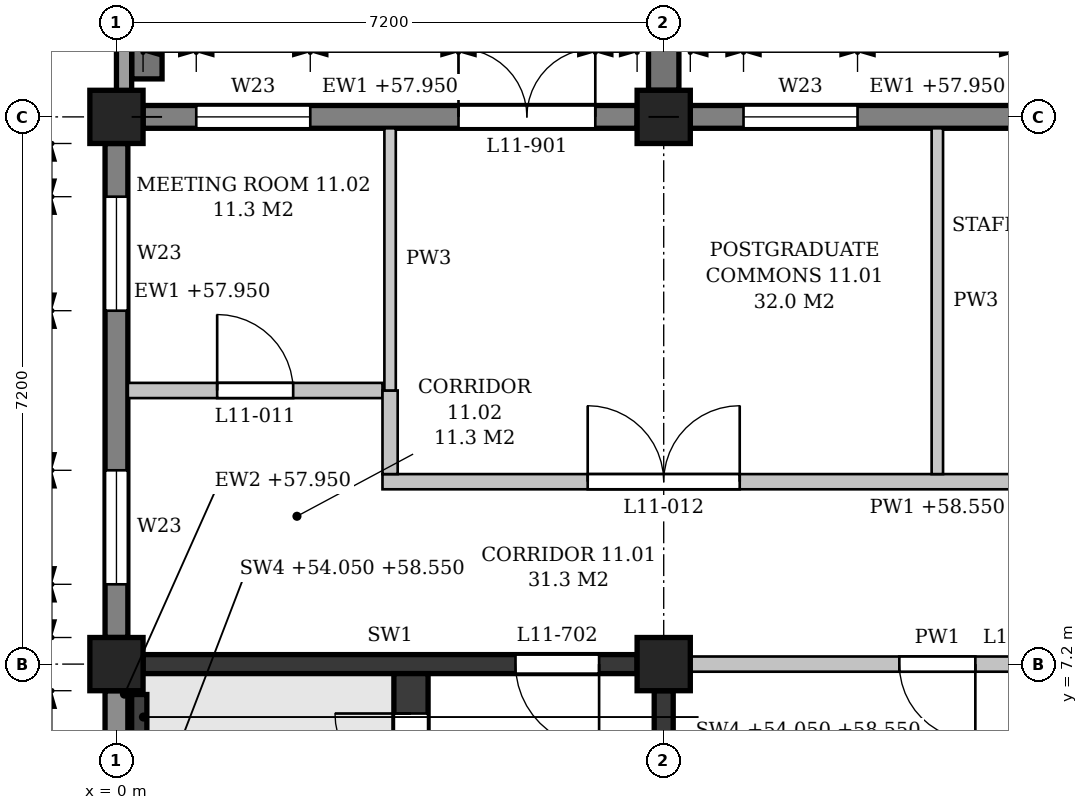
"""IFC4 building model, lengths in metres.
Left out: names, types, materials, properties, quantities, classifications, styles, units other than length and angle.
Written with IfcOpenShell. Run it as: python <this file> out.ifc"""

import sys

from ifc_helpers import new_model, si_unit, direction, frame, frame_2d, origin, origin_2d, place, context, subcontext, project, spatial, polyline, rectangle, outline, extrude, element, fill, save


model = new_model("IFC4")
c1 = context("Model", 3, precision=1e-05, world=origin(), true_north=direction((0.0, 1.0)))
c2 = subcontext(c1, "Body", "Model", "MODEL_VIEW")
j1 = project(units=[si_unit("LENGTHUNIT", "METRE"), si_unit("PLANEANGLEUNIT", "RADIAN")], contexts=[c1])
p1 = place(None, origin())
s1 = spatial("IfcSite", under=j1, at=p1, CompositionType="ELEMENT")
p2 = place(p1, origin())
s2 = spatial("IfcBuilding", under=s1, at=p2, CompositionType="ELEMENT")
p3 = place(p2, frame((0.0, 0.0, 54.3)))
s3 = spatial("IfcBuildingStorey", under=s2, at=p3, CompositionType="ELEMENT", Elevation=54.3)
for number, where, z_axis, x_axis in (
    (1, (0.0, 7.2, 0.0), (0.0, 0.0, 1.0), (1.0, 0.0, 0.0)),
    (2, (0.0, 14.4, 0.0), (0.0, 0.0, 1.0), (1.0, 0.0, 0.0)),
    (3, (7.2, 7.2, 0.0), (0.0, 0.0, 1.0), (1.0, 0.0, 0.0)),
    (4, (7.2, 14.4, 0.0), (0.0, 0.0, 1.0), (1.0, 0.0, 0.0)),
):
    element("IfcColumn", number, at=place(p3, frame(where, z_axis=z_axis, x_axis=x_axis)), inside=s3, PredefinedType="COLUMN", context=c2, shape_type="SweptSolid", body=[
        extrude(rectangle(XDim=0.7, YDim=0.7, at=origin_2d()), origin(), (0.0, 0.0, 1.0), 4.5),
    ])
p4 = place(p3, frame((0.1, 14.55, 0.0), z_axis=(0.0, 0.0, 1.0), x_axis=(0.0, 1.0, 0.0)))
e5 = element("IfcWall", 5, at=p4, inside=s3, PredefinedType="STANDARD", context=c2, shape_type="SweptSolid", body=[
    extrude(rectangle(XDim=7.05, YDim=0.2, at=frame_2d((3.525, 0.0))), origin(), (0.0, 0.0, 1.0), 0.15),
])
p5 = place(p3, frame((0.0, 0.35, 0.0), z_axis=(0.0, 0.0, 1.0), x_axis=(0.0, 1.0, 0.0)))
e6 = element("IfcWall", 6, at=p5, inside=s3, PredefinedType="STANDARD", context=c2, shape_type="SweptSolid", body=[
    extrude(rectangle(XDim=6.5, YDim=0.3, at=frame_2d((3.25, 0.0))), origin(), (0.0, 0.0, 1.0), 3.65),
])
p6 = place(p5, frame((1.0, 0.0, 0.9)))
e7 = element("IfcOpeningElement", 7, at=p6, cuts=e6, PredefinedType="OPENING", context=c2, shape_type="SweptSolid", body=[
    extrude(outline(polyline([(0.0, 0.0), (0.9, 0.0), (0.9, 2.25), (0.45, 2.7), (0.0, 2.25), (0.0, 0.0)])), frame((0.0, 0.16, 0.0), z_axis=(0.0, -1.0, 0.0), x_axis=(1.0, 0.0, 0.0)), (0.0, 0.0, 1.0), 0.32),
])
p7 = place(p5, frame((4.6, 0.0, 0.9)))
e8 = element("IfcOpeningElement", 8, at=p7, cuts=e6, PredefinedType="OPENING", context=c2, shape_type="SweptSolid", body=[
    extrude(outline(polyline([(0.0, 0.0), (0.9, 0.0), (0.9, 2.25), (0.45, 2.7), (0.0, 2.25), (0.0, 0.0)])), frame((0.0, 0.16, 0.0), z_axis=(0.0, -1.0, 0.0), x_axis=(1.0, 0.0, 0.0)), (0.0, 0.0, 1.0), 0.32),
])
p8 = place(p3, frame((0.0, 7.55, 0.0), z_axis=(0.0, 0.0, 1.0), x_axis=(0.0, 1.0, 0.0)))
e9 = element("IfcWall", 9, at=p8, inside=s3, PredefinedType="STANDARD", context=c2, shape_type="SweptSolid", body=[
    extrude(rectangle(XDim=6.5, YDim=0.3, at=frame_2d((3.25, 0.0))), origin(), (0.0, 0.0, 1.0), 3.65),
])
p9 = place(p8, frame((0.7, 0.0, 0.9)))
e10 = element("IfcOpeningElement", 10, at=p9, cuts=e9, PredefinedType="OPENING", context=c2, shape_type="SweptSolid", body=[
    extrude(outline(polyline([(0.0, 0.0), (1.5, 0.0), (1.5, 1.95), (0.75, 2.7), (0.0, 1.95), (0.0, 0.0)])), frame((0.0, 0.16, 0.0), z_axis=(0.0, -1.0, 0.0), x_axis=(1.0, 0.0, 0.0)), (0.0, 0.0, 1.0), 0.32),
])
p10 = place(p8, frame((4.3, 0.0, 0.9)))
e11 = element("IfcOpeningElement", 11, at=p10, cuts=e9, PredefinedType="OPENING", context=c2, shape_type="SweptSolid", body=[
    extrude(outline(polyline([(0.0, 0.0), (1.5, 0.0), (1.5, 1.95), (0.75, 2.7), (0.0, 1.95), (0.0, 0.0)])), frame((0.0, 0.16, 0.0), z_axis=(0.0, -1.0, 0.0), x_axis=(1.0, 0.0, 0.0)), (0.0, 0.0, 1.0), 0.32),
])
p11 = place(p3, frame((14.05, 14.4, 0.0), z_axis=(0.0, 0.0, 1.0), x_axis=(-1.0, 0.0, 0.0)))
e12 = element("IfcWall", 12, at=p11, inside=s3, PredefinedType="STANDARD", context=c2, shape_type="SweptSolid", body=[
    extrude(rectangle(XDim=6.5, YDim=0.3, at=frame_2d((3.25, 0.0))), origin(), (0.0, 0.0, 1.0), 3.65),
])
p12 = place(p11, frame((0.7, 0.0, 0.9)))
e13 = element("IfcOpeningElement", 13, at=p12, cuts=e12, PredefinedType="OPENING", context=c2, shape_type="SweptSolid", body=[
    extrude(outline(polyline([(0.0, 0.0), (1.5, 0.0), (1.5, 1.95), (0.75, 2.7), (0.0, 1.95), (0.0, 0.0)])), frame((0.0, 0.16, 0.0), z_axis=(0.0, -1.0, 0.0), x_axis=(1.0, 0.0, 0.0)), (0.0, 0.0, 1.0), 0.32),
])
p13 = place(p11, frame((4.3, 0.0, 0.9)))
e14 = element("IfcOpeningElement", 14, at=p13, cuts=e12, PredefinedType="OPENING", context=c2, shape_type="SweptSolid", body=[
    extrude(outline(polyline([(0.0, 0.0), (1.5, 0.0), (1.5, 1.95), (0.75, 2.7), (0.0, 1.95), (0.0, 0.0)])), frame((0.0, 0.16, 0.0), z_axis=(0.0, -1.0, 0.0), x_axis=(1.0, 0.0, 0.0)), (0.0, 0.0, 1.0), 0.32),
])
p14 = place(p3, frame((6.85, 14.4, 0.0), z_axis=(0.0, 0.0, 1.0), x_axis=(-1.0, 0.0, 0.0)))
e15 = element("IfcWall", 15, at=p14, inside=s3, PredefinedType="STANDARD", context=c2, shape_type="SweptSolid", body=[
    extrude(rectangle(XDim=6.5, YDim=0.3, at=frame_2d((3.25, 0.0))), origin(), (0.0, 0.0, 1.0), 3.65),
])
p15 = place(p14, frame((0.55, 0.0, 0.0)))
e16 = element("IfcOpeningElement", 16, at=p15, cuts=e15, PredefinedType="OPENING", context=c2, shape_type="SweptSolid", body=[
    extrude(rectangle(XDim=1.8, YDim=2.4, at=frame_2d((0.9, 1.2))), frame((0.0, 0.16, 0.0), z_axis=(0.0, -1.0, 0.0), x_axis=(1.0, 0.0, 0.0)), (0.0, 0.0, 1.0), 0.32),
])
p16 = place(p14, frame((4.3, 0.0, 0.9)))
e17 = element("IfcOpeningElement", 17, at=p16, cuts=e15, PredefinedType="OPENING", context=c2, shape_type="SweptSolid", body=[
    extrude(outline(polyline([(0.0, 0.0), (1.5, 0.0), (1.5, 1.95), (0.75, 2.7), (0.0, 1.95), (0.0, 0.0)])), frame((0.0, 0.16, 0.0), z_axis=(0.0, -1.0, 0.0), x_axis=(1.0, 0.0, 0.0)), (0.0, 0.0, 1.0), 0.32),
])
for number, where, z_axis, x_axis in (
    (18, (0.4, 14.9, 0.0), (0.0, 0.0, 1.0), (0.0, 1.0, 0.0)),
    (19, (7.2, 14.75, 0.0), (0.0, 0.0, 1.0), (0.0, 1.0, 0.0)),
):
    element("IfcWall", number, at=place(p3, frame(where, z_axis=z_axis, x_axis=x_axis)), inside=s3, PredefinedType="POLYGONAL", context=c2, shape_type="SweptSolid", body=[
        extrude(outline(polyline([(0.65, 0.0), (0.65, 4.025), (0.5, 4.25), (0.0, 4.25), (0.0, 0.0), (0.65, 0.0)])), frame((0.0, 0.2, 0.0), z_axis=(0.0, -1.0, 0.0), x_axis=(1.0, 0.0, 0.0)), (0.0, 0.0, 1.0), 0.4),
    ])
p17 = place(p3, frame((0.35, 7.2, 0.0), z_axis=(0.0, 0.0, 1.0), x_axis=(1.0, 0.0, 0.0)))
e20 = element("IfcWall", 20, at=p17, inside=s3, PredefinedType="SHEAR", context=c2, shape_type="SweptSolid", body=[
    extrude(rectangle(XDim=6.5, YDim=0.25, at=frame_2d((3.25, 0.0))), origin(), (0.0, 0.0, 1.0), 3.55),
])
p18 = place(p17, frame((4.9, 0.0, 0.0)))
e21 = element("IfcOpeningElement", 21, at=p18, cuts=e20, PredefinedType="OPENING", context=c2, shape_type="SweptSolid", body=[
    extrude(rectangle(XDim=1.1, YDim=2.1, at=frame_2d((0.55, 1.05))), frame((0.0, 0.135, 0.0), z_axis=(0.0, -1.0, 0.0), x_axis=(1.0, 0.0, 0.0)), (0.0, 0.0, 1.0), 0.27),
])
p19 = place(p3, frame((7.2, 0.35, 0.0), z_axis=(0.0, 0.0, 1.0), x_axis=(0.0, 1.0, 0.0)))
e22 = element("IfcWall", 22, at=p19, inside=s3, PredefinedType="SHEAR", context=c2, shape_type="SweptSolid", body=[
    extrude(rectangle(XDim=6.5, YDim=0.25, at=frame_2d((3.25, 0.0))), origin(), (0.0, 0.0, 1.0), 3.55),
])
p20 = place(p3, frame((0.3, 5.85, -0.25), z_axis=(0.0, 0.0, 1.0), x_axis=(0.0, 1.0, 0.0)))
e23 = element("IfcWall", 23, at=p20, inside=s3, PredefinedType="SHEAR", context=c2, shape_type="SweptSolid", body=[
    extrude(rectangle(XDim=0.95, YDim=0.2, at=frame_2d((0.475, 0.0))), origin(), (0.0, 0.0, 1.0), 4.5),
])
p21 = place(p3, frame((3.875, 0.15, 0.0), z_axis=(0.0, 0.0, 1.0), x_axis=(0.0, 1.0, 0.0)))
e24 = element("IfcWall", 24, at=p21, inside=s3, PredefinedType="SHEAR", context=c2, shape_type="SweptSolid", body=[
    extrude(rectangle(XDim=6.925, YDim=0.45, at=frame_2d((3.462, 0.0))), origin(), (0.0, 0.0, 1.0), 4.25),
])
p22 = place(p21, frame((5.4, 0.0, 0.0)))
e25 = element("IfcOpeningElement", 25, at=p22, cuts=e24, PredefinedType="OPENING", context=c2, shape_type="SweptSolid", body=[
    extrude(rectangle(XDim=1.0, YDim=2.1, at=frame_2d((0.5, 1.05))), frame((0.0, 0.235, 0.0), z_axis=(0.0, -1.0, 0.0), x_axis=(1.0, 0.0, 0.0)), (0.0, 0.0, 1.0), 0.47),
])
p23 = place(p3, frame((7.55, 7.2, 0.0), z_axis=(0.0, 0.0, 1.0), x_axis=(1.0, 0.0, 0.0)))
e26 = element("IfcWall", 26, at=p23, inside=s3, PredefinedType="PARTITIONING", context=c2, shape_type="SweptSolid", body=[
    extrude(rectangle(XDim=6.5, YDim=0.2, at=frame_2d((3.25, 0.0))), origin(), (0.0, 0.0, 1.0), 3.55),
])
p24 = place(p23, frame((2.75, 0.0, 0.0)))
e27 = element("IfcOpeningElement", 27, at=p24, cuts=e26, PredefinedType="OPENING", context=c2, shape_type="SweptSolid", body=[
    extrude(rectangle(XDim=1.0, YDim=2.1, at=frame_2d((0.5, 1.05))), frame((0.0, 0.11, 0.0), z_axis=(0.0, -1.0, 0.0), x_axis=(1.0, 0.0, 0.0)), (0.0, 0.0, 1.0), 0.22),
])
p25 = place(p3, frame((3.5, 9.6, 0.0), z_axis=(0.0, 0.0, 1.0), x_axis=(1.0, 0.0, 0.0)))
e28 = element("IfcWall", 28, at=p25, inside=s3, PredefinedType="PARTITIONING", context=c2, shape_type="SweptSolid", body=[
    extrude(outline(polyline([(0.0, 0.0), (14.6, 0.0), (14.6, 4.25), (11.125, 4.25), (11.125, 3.55), (10.675, 3.55), (10.675, 4.25), (3.925, 4.25), (3.925, 3.55), (3.475, 3.55), (3.475, 4.25), (0.0, 4.25), (0.0, 0.0)])), frame((0.0, 0.1, 0.0), z_axis=(0.0, -1.0, 0.0), x_axis=(1.0, 0.0, 0.0)), (0.0, 0.0, 1.0), 0.2),
])
p26 = place(p25, frame((2.7, 0.0, 0.0)))
e29 = element("IfcOpeningElement", 29, at=p26, cuts=e28, PredefinedType="OPENING", context=c2, shape_type="SweptSolid", body=[
    extrude(rectangle(XDim=2.0, YDim=2.1, at=frame_2d((1.0, 1.05))), frame((0.0, 0.11, 0.0), z_axis=(0.0, -1.0, 0.0), x_axis=(1.0, 0.0, 0.0)), (0.0, 0.0, 1.0), 0.22),
])
p27 = place(p25, frame((8.6, 0.0, 0.0)))
e30 = element("IfcOpeningElement", 30, at=p27, cuts=e28, PredefinedType="OPENING", context=c2, shape_type="SweptSolid", body=[
    extrude(rectangle(XDim=1.0, YDim=2.1, at=frame_2d((0.5, 1.05))), frame((0.0, 0.11, 0.0), z_axis=(0.0, -1.0, 0.0), x_axis=(1.0, 0.0, 0.0)), (0.0, 0.0, 1.0), 0.22),
])
p28 = place(p3, frame((0.15, 10.8, 0.0), z_axis=(0.0, 0.0, 1.0), x_axis=(1.0, 0.0, 0.0)))
e31 = element("IfcWall", 31, at=p28, inside=s3, PredefinedType="PARTITIONING", context=c2, shape_type="SweptSolid", body=[
    extrude(outline(polyline([(0.0, 0.0), (3.35, 0.0), (3.35, 4.25), (0.05, 4.25), (0.05, 3.65), (0.0, 3.65), (0.0, 0.0)])), frame((0.0, 0.1, 0.0), z_axis=(0.0, -1.0, 0.0), x_axis=(1.0, 0.0, 0.0)), (0.0, 0.0, 1.0), 0.2),
])
p29 = place(p28, frame((1.175, 0.0, 0.0)))
e32 = element("IfcOpeningElement", 32, at=p29, cuts=e31, PredefinedType="OPENING", context=c2, shape_type="SweptSolid", body=[
    extrude(rectangle(XDim=1.0, YDim=2.1, at=frame_2d((0.5, 1.05))), frame((0.0, 0.11, 0.0), z_axis=(0.0, -1.0, 0.0), x_axis=(1.0, 0.0, 0.0)), (0.0, 0.0, 1.0), 0.22),
])
p30 = place(p3, frame((3.6, 9.7, 0.0), z_axis=(0.0, 0.0, 1.0), x_axis=(0.0, 1.0, 0.0)))
e33 = element("IfcWall", 33, at=p30, inside=s3, PredefinedType="PARTITIONING", context=c2, shape_type="SweptSolid", body=[
    extrude(rectangle(XDim=1.1, YDim=0.2, at=frame_2d((0.55, 0.0))), origin(), (0.0, 0.0, 1.0), 4.25),
])
p31 = place(p3, frame((3.6, 10.8, 0.0), z_axis=(0.0, 0.0, 1.0), x_axis=(0.0, 1.0, 0.0)))
e34 = element("IfcWall", 34, at=p31, inside=s3, PredefinedType="PARTITIONING", context=c2, shape_type="SweptSolid", body=[
    extrude(rectangle(XDim=3.45, YDim=0.15, at=frame_2d((1.725, 0.0))), origin(), (0.0, 0.0, 1.0), 3.55),
])
p32 = place(p3, frame((10.8, 9.7, 0.0), z_axis=(0.0, 0.0, 1.0), x_axis=(0.0, 1.0, 0.0)))
e35 = element("IfcWall", 35, at=p32, inside=s3, PredefinedType="PARTITIONING", context=c2, shape_type="SweptSolid", body=[
    extrude(rectangle(XDim=4.55, YDim=0.15, at=frame_2d((2.275, 0.0))), origin(), (0.0, 0.0, 1.0), 3.55),
])
p33 = place(p15, frame((1.8, 0.0, 0.0), z_axis=(0.0, 0.0, 1.0), x_axis=(-1.0, 0.0, 0.0)))
e36 = element("IfcDoor", 36, at=p33, inside=s3, OperationType="DOUBLE_DOOR_SINGLE_SWING", PredefinedType="DOOR", context=c2, shape_type="SweptSolid", body=[
    extrude(rectangle(XDim=1.8, YDim=2.4, at=frame_2d((0.9, 1.2))), frame((0.0, 0.025, 0.0), z_axis=(0.0, -1.0, 0.0), x_axis=(1.0, 0.0, 0.0)), (0.0, 0.0, 1.0), 0.05),
])
fill(e16, e36)
p34 = place(p13, origin())
e37 = element("IfcWindow", 37, at=p34, inside=s3, PartitioningType="SINGLE_PANEL", PredefinedType="WINDOW", context=c2, shape_type="SweptSolid", body=[
    extrude(outline(polyline([(0.0, 0.0), (1.5, 0.0), (1.5, 1.95), (0.75, 2.7), (0.0, 1.95), (0.0, 0.0)])), frame((0.0, 0.03, 0.0), z_axis=(0.0, -1.0, 0.0), x_axis=(1.0, 0.0, 0.0)), (0.0, 0.0, 1.0), 0.06),
])
fill(e14, e37)
p35 = place(p16, origin())
e38 = element("IfcWindow", 38, at=p35, inside=s3, PartitioningType="SINGLE_PANEL", PredefinedType="WINDOW", context=c2, shape_type="SweptSolid", body=[
    extrude(outline(polyline([(0.0, 0.0), (1.5, 0.0), (1.5, 1.95), (0.75, 2.7), (0.0, 1.95), (0.0, 0.0)])), frame((0.0, 0.03, 0.0), z_axis=(0.0, -1.0, 0.0), x_axis=(1.0, 0.0, 0.0)), (0.0, 0.0, 1.0), 0.06),
])
fill(e17, e38)
p36 = place(p9, origin())
e39 = element("IfcWindow", 39, at=p36, inside=s3, PartitioningType="SINGLE_PANEL", PredefinedType="WINDOW", context=c2, shape_type="SweptSolid", body=[
    extrude(outline(polyline([(0.0, 0.0), (1.5, 0.0), (1.5, 1.95), (0.75, 2.7), (0.0, 1.95), (0.0, 0.0)])), frame((0.0, 0.03, 0.0), z_axis=(0.0, -1.0, 0.0), x_axis=(1.0, 0.0, 0.0)), (0.0, 0.0, 1.0), 0.06),
])
fill(e10, e39)
p37 = place(p10, origin())
e40 = element("IfcWindow", 40, at=p37, inside=s3, PartitioningType="SINGLE_PANEL", PredefinedType="WINDOW", context=c2, shape_type="SweptSolid", body=[
    extrude(outline(polyline([(0.0, 0.0), (1.5, 0.0), (1.5, 1.95), (0.75, 2.7), (0.0, 1.95), (0.0, 0.0)])), frame((0.0, 0.03, 0.0), z_axis=(0.0, -1.0, 0.0), x_axis=(1.0, 0.0, 0.0)), (0.0, 0.0, 1.0), 0.06),
])
fill(e11, e40)
p38 = place(p22, origin())
e41 = element("IfcDoor", 41, at=p38, inside=s3, OperationType="SINGLE_SWING_RIGHT", PredefinedType="DOOR", context=c2, shape_type="SweptSolid", body=[
    extrude(rectangle(XDim=1.0, YDim=2.1, at=frame_2d((0.5, 1.05))), frame((0.0, 0.025, 0.0), z_axis=(0.0, -1.0, 0.0), x_axis=(1.0, 0.0, 0.0)), (0.0, 0.0, 1.0), 0.05),
])
fill(e25, e41)
p39 = place(p18, frame((1.1, 0.0, 0.0), z_axis=(0.0, 0.0, 1.0), x_axis=(-1.0, 0.0, 0.0)))
e42 = element("IfcDoor", 42, at=p39, inside=s3, OperationType="SINGLE_SWING_LEFT", PredefinedType="DOOR", context=c2, shape_type="SweptSolid", body=[
    extrude(rectangle(XDim=1.1, YDim=2.1, at=frame_2d((0.55, 1.05))), frame((0.0, 0.025, 0.0), z_axis=(0.0, -1.0, 0.0), x_axis=(1.0, 0.0, 0.0)), (0.0, 0.0, 1.0), 0.05),
])
fill(e21, e42)
p40 = place(p24, frame((1.0, 0.0, 0.0), z_axis=(0.0, 0.0, 1.0), x_axis=(-1.0, 0.0, 0.0)))
e43 = element("IfcDoor", 43, at=p40, inside=s3, OperationType="SINGLE_SWING_LEFT", PredefinedType="DOOR", context=c2, shape_type="SweptSolid", body=[
    extrude(rectangle(XDim=1.0, YDim=2.1, at=frame_2d((0.5, 1.05))), frame((0.0, 0.025, 0.0), z_axis=(0.0, -1.0, 0.0), x_axis=(1.0, 0.0, 0.0)), (0.0, 0.0, 1.0), 0.05),
])
fill(e27, e43)
p41 = place(p29, origin())
e44 = element("IfcDoor", 44, at=p41, inside=s3, OperationType="SINGLE_SWING_LEFT", PredefinedType="DOOR", context=c2, shape_type="SweptSolid", body=[
    extrude(rectangle(XDim=1.0, YDim=2.1, at=frame_2d((0.5, 1.05))), frame((0.0, 0.025, 0.0), z_axis=(0.0, -1.0, 0.0), x_axis=(1.0, 0.0, 0.0)), (0.0, 0.0, 1.0), 0.05),
])
fill(e32, e44)
p42 = place(p26, origin())
e45 = element("IfcDoor", 45, at=p42, inside=s3, OperationType="DOUBLE_DOOR_SINGLE_SWING", PredefinedType="DOOR", context=c2, shape_type="SweptSolid", body=[
    extrude(rectangle(XDim=2.0, YDim=2.1, at=frame_2d((1.0, 1.05))), frame((0.0, 0.025, 0.0), z_axis=(0.0, -1.0, 0.0), x_axis=(1.0, 0.0, 0.0)), (0.0, 0.0, 1.0), 0.05),
])
fill(e29, e45)
save(model, sys.argv[1])
